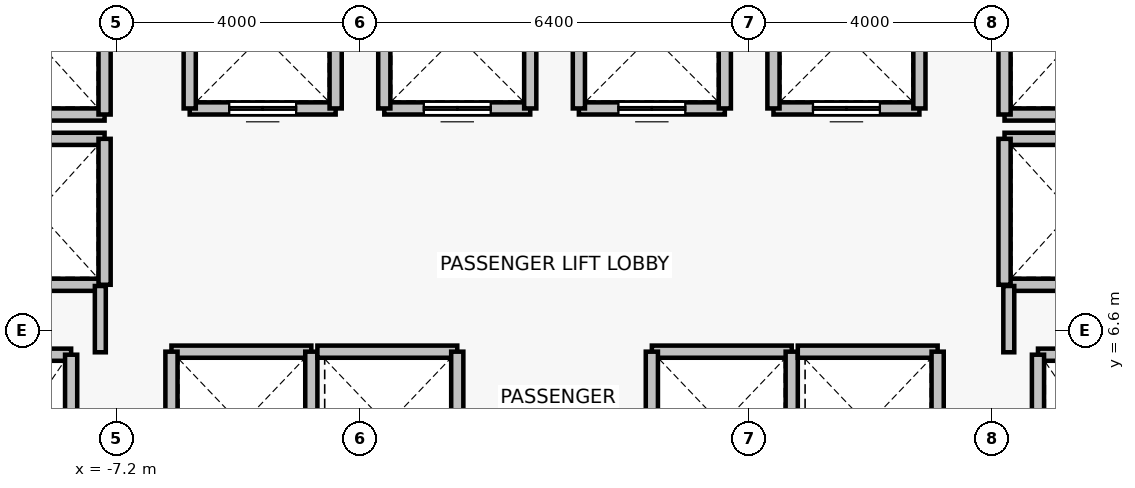
"""IFC4 building model, lengths in metres.
Left out: names, types, materials, properties, quantities, classifications, styles, units other than length and angle.
Written with IfcOpenShell. Run it as: python <this file> out.ifc"""

import sys

from ifc_helpers import new_model, si_unit, direction, frame, frame_2d, origin, place, context, subcontext, project, spatial, rectangle, extrude, source, transform, mapped, element, fill, save


model = new_model("IFC4")
c1 = context("Model", 3, precision=1e-05, world=origin(), true_north=direction((0.0, 1.0)))
c2 = subcontext(c1, "Body", "Model", "MODEL_VIEW")
j1 = project(units=[si_unit("LENGTHUNIT", "METRE"), si_unit("PLANEANGLEUNIT", "RADIAN")], contexts=[c1])
p1 = place(None, origin())
s1 = spatial("IfcSite", under=j1, at=p1, CompositionType="ELEMENT")
p2 = place(p1, origin())
s2 = spatial("IfcBuilding", under=s1, at=p2, CompositionType="ELEMENT")
p3 = place(p2, frame((0.0, 0.0, 30.7)))
s3 = spatial("IfcBuildingStorey", under=s2, at=p3, CompositionType="ELEMENT", Elevation=30.7)
p4 = place(p3, frame((-9.95, 6.2, 0.0), z_axis=(0.0, 0.0, 1.0), x_axis=(1.0, 0.0, 0.0)))
e1 = element("IfcWall", 1, at=p4, inside=s3, PredefinedType="SOLIDWALL", context=c2, shape_type="SweptSolid", body=[
    extrude(rectangle(XDim=2.0, YDim=0.2, at=frame_2d((1.0, 0.0))), origin(), (0.0, 0.0, 1.0), 3.075),
])
p5 = place(p3, frame((-7.95, 6.2, 0.0), z_axis=(0.0, 0.0, 1.0), x_axis=(0.0, -1.0, 0.0)))
e2 = element("IfcWall", 2, at=p5, inside=s3, PredefinedType="SOLIDWALL", context=c2, shape_type="SweptSolid", body=[
    extrude(rectangle(XDim=2.8, YDim=0.2, at=frame_2d((1.4, 0.0))), origin(), (0.0, 0.0, 1.0), 3.075),
])
p6 = place(p3, frame((7.95, 6.2, 0.0), z_axis=(0.0, 0.0, 1.0), x_axis=(1.0, 0.0, 0.0)))
e3 = element("IfcWall", 3, at=p6, inside=s3, PredefinedType="SOLIDWALL", context=c2, shape_type="SweptSolid", body=[
    extrude(rectangle(XDim=2.0, YDim=0.2, at=frame_2d((1.0, 0.0))), origin(), (0.0, 0.0, 1.0), 3.075),
])
p7 = place(p3, frame((7.95, 3.4, 0.0), z_axis=(0.0, 0.0, 1.0), x_axis=(0.0, 1.0, 0.0)))
e4 = element("IfcWall", 4, at=p7, inside=s3, PredefinedType="SOLIDWALL", context=c2, shape_type="SweptSolid", body=[
    extrude(rectangle(XDim=2.8, YDim=0.2, at=frame_2d((1.4, 0.0))), origin(), (0.0, 0.0, 1.0), 3.075),
])
p8 = place(p3, frame((-3.6, 10.25, 0.0), z_axis=(0.0, 0.0, 1.0), x_axis=(-1.0, 0.0, 0.0)))
e5 = element("IfcWall", 5, at=p8, inside=s3, PredefinedType="SOLIDWALL", context=c2, shape_type="SweptSolid", body=[
    extrude(rectangle(XDim=2.4, YDim=0.2, at=frame_2d((1.2, 0.0))), origin(), (0.0, 0.0, 1.0), 3.075),
])
p9 = place(p8, frame((0.65, 0.0, 0.0)))
e6 = element("IfcOpeningElement", 6, at=p9, cuts=e5, PredefinedType="OPENING", context=c2, shape_type="SweptSolid", body=[
    extrude(rectangle(XDim=1.1, YDim=2.2, at=frame_2d((0.55, 1.1))), frame((0.0, 0.11, 0.0), z_axis=(0.0, -1.0, 0.0), x_axis=(1.0, 0.0, 0.0)), (0.0, 0.0, 1.0), 0.22),
])
for number, where, z_axis, x_axis in (
    (7, (-6.0, 10.25, 0.0), (0.0, 0.0, 1.0), (0.0, 1.0, 0.0)),
    (8, (-3.6, 12.65, 0.0), (0.0, 0.0, 1.0), (0.0, -1.0, 0.0)),
):
    element("IfcWall", number, at=place(p3, frame(where, z_axis=z_axis, x_axis=x_axis)), inside=s3, PredefinedType="SOLIDWALL", context=c2, shape_type="SweptSolid", body=[
        extrude(rectangle(XDim=2.4, YDim=0.2, at=frame_2d((1.2, 0.0))), origin(), (0.0, 0.0, 1.0), 3.075),
    ])
p10 = place(p3, frame((-0.4, 10.25, 0.0), z_axis=(0.0, 0.0, 1.0), x_axis=(-1.0, 0.0, 0.0)))
e9 = element("IfcWall", 9, at=p10, inside=s3, PredefinedType="SOLIDWALL", context=c2, shape_type="SweptSolid", body=[
    extrude(rectangle(XDim=2.4, YDim=0.2, at=frame_2d((1.2, 0.0))), origin(), (0.0, 0.0, 1.0), 3.075),
])
p11 = place(p10, frame((0.65, 0.0, 0.0)))
e10 = element("IfcOpeningElement", 10, at=p11, cuts=e9, PredefinedType="OPENING", context=c2, shape_type="SweptSolid", body=[
    extrude(rectangle(XDim=1.1, YDim=2.2, at=frame_2d((0.55, 1.1))), frame((0.0, 0.11, 0.0), z_axis=(0.0, -1.0, 0.0), x_axis=(1.0, 0.0, 0.0)), (0.0, 0.0, 1.0), 0.22),
])
for number, where, z_axis, x_axis in (
    (11, (-2.8, 10.25, 0.0), (0.0, 0.0, 1.0), (0.0, 1.0, 0.0)),
    (12, (-0.4, 12.65, 0.0), (0.0, 0.0, 1.0), (0.0, -1.0, 0.0)),
):
    element("IfcWall", number, at=place(p3, frame(where, z_axis=z_axis, x_axis=x_axis)), inside=s3, PredefinedType="SOLIDWALL", context=c2, shape_type="SweptSolid", body=[
        extrude(rectangle(XDim=2.4, YDim=0.2, at=frame_2d((1.2, 0.0))), origin(), (0.0, 0.0, 1.0), 3.075),
    ])
p12 = place(p3, frame((2.8, 10.25, 0.0), z_axis=(0.0, 0.0, 1.0), x_axis=(-1.0, 0.0, 0.0)))
e13 = element("IfcWall", 13, at=p12, inside=s3, PredefinedType="SOLIDWALL", context=c2, shape_type="SweptSolid", body=[
    extrude(rectangle(XDim=2.4, YDim=0.2, at=frame_2d((1.2, 0.0))), origin(), (0.0, 0.0, 1.0), 3.075),
])
p13 = place(p12, frame((0.65, 0.0, 0.0)))
e14 = element("IfcOpeningElement", 14, at=p13, cuts=e13, PredefinedType="OPENING", context=c2, shape_type="SweptSolid", body=[
    extrude(rectangle(XDim=1.1, YDim=2.2, at=frame_2d((0.55, 1.1))), frame((0.0, 0.11, 0.0), z_axis=(0.0, -1.0, 0.0), x_axis=(1.0, 0.0, 0.0)), (0.0, 0.0, 1.0), 0.22),
])
for number, where, z_axis, x_axis in (
    (15, (0.4, 10.25, 0.0), (0.0, 0.0, 1.0), (0.0, 1.0, 0.0)),
    (16, (2.8, 12.65, 0.0), (0.0, 0.0, 1.0), (0.0, -1.0, 0.0)),
):
    element("IfcWall", number, at=place(p3, frame(where, z_axis=z_axis, x_axis=x_axis)), inside=s3, PredefinedType="SOLIDWALL", context=c2, shape_type="SweptSolid", body=[
        extrude(rectangle(XDim=2.4, YDim=0.2, at=frame_2d((1.2, 0.0))), origin(), (0.0, 0.0, 1.0), 3.075),
    ])
p14 = place(p3, frame((6.0, 10.25, 0.0), z_axis=(0.0, 0.0, 1.0), x_axis=(-1.0, 0.0, 0.0)))
e17 = element("IfcWall", 17, at=p14, inside=s3, PredefinedType="SOLIDWALL", context=c2, shape_type="SweptSolid", body=[
    extrude(rectangle(XDim=2.4, YDim=0.2, at=frame_2d((1.2, 0.0))), origin(), (0.0, 0.0, 1.0), 3.075),
])
p15 = place(p14, frame((0.65, 0.0, 0.0)))
e18 = element("IfcOpeningElement", 18, at=p15, cuts=e17, PredefinedType="OPENING", context=c2, shape_type="SweptSolid", body=[
    extrude(rectangle(XDim=1.1, YDim=2.2, at=frame_2d((0.55, 1.1))), frame((0.0, 0.11, 0.0), z_axis=(0.0, -1.0, 0.0), x_axis=(1.0, 0.0, 0.0)), (0.0, 0.0, 1.0), 0.22),
])
for number, where, z_axis, x_axis in (
    (19, (3.6, 10.25, 0.0), (0.0, 0.0, 1.0), (0.0, 1.0, 0.0)),
    (20, (6.0, 12.65, 0.0), (0.0, 0.0, 1.0), (0.0, -1.0, 0.0)),
):
    element("IfcWall", number, at=place(p3, frame(where, z_axis=z_axis, x_axis=x_axis)), inside=s3, PredefinedType="SOLIDWALL", context=c2, shape_type="SweptSolid", body=[
        extrude(rectangle(XDim=2.4, YDim=0.2, at=frame_2d((1.2, 0.0))), origin(), (0.0, 0.0, 1.0), 3.075),
    ])
p16 = place(p3, frame((-6.3, 6.25, 0.0), z_axis=(0.0, 0.0, 1.0), x_axis=(1.0, 0.0, 0.0)))
e21 = element("IfcWall", 21, at=p16, inside=s3, PredefinedType="SOLIDWALL", context=c2, shape_type="SweptSolid", body=[
    extrude(rectangle(XDim=2.3, YDim=0.2, at=frame_2d((1.15, 0.0))), origin(), (0.0, 0.0, 1.0), 3.075),
])
for number, where, z_axis, x_axis in (
    (22, (-6.3, 3.85, 0.0), (0.0, 0.0, 1.0), (0.0, 1.0, 0.0)),
    (23, (-4.0, 6.25, 0.0), (0.0, 0.0, 1.0), (0.0, -1.0, 0.0)),
):
    element("IfcWall", number, at=place(p3, frame(where, z_axis=z_axis, x_axis=x_axis)), inside=s3, PredefinedType="SOLIDWALL", context=c2, shape_type="SweptSolid", body=[
        extrude(rectangle(XDim=2.4, YDim=0.2, at=frame_2d((1.2, 0.0))), origin(), (0.0, 0.0, 1.0), 3.075),
    ])
p17 = place(p3, frame((-3.9, 6.25, 0.0), z_axis=(0.0, 0.0, 1.0), x_axis=(1.0, 0.0, 0.0)))
e24 = element("IfcWall", 24, at=p17, inside=s3, PredefinedType="SOLIDWALL", context=c2, shape_type="SweptSolid", body=[
    extrude(rectangle(XDim=2.3, YDim=0.2, at=frame_2d((1.15, 0.0))), origin(), (0.0, 0.0, 1.0), 3.075),
])
p18 = place(p3, frame((-1.6, 6.25, 0.0), z_axis=(0.0, 0.0, 1.0), x_axis=(0.0, -1.0, 0.0)))
e25 = element("IfcWall", 25, at=p18, inside=s3, PredefinedType="SOLIDWALL", context=c2, shape_type="SweptSolid", body=[
    extrude(rectangle(XDim=2.4, YDim=0.2, at=frame_2d((1.2, 0.0))), origin(), (0.0, 0.0, 1.0), 3.075),
])
p19 = place(p3, frame((1.6, 6.25, 0.0), z_axis=(0.0, 0.0, 1.0), x_axis=(1.0, 0.0, 0.0)))
e26 = element("IfcWall", 26, at=p19, inside=s3, PredefinedType="SOLIDWALL", context=c2, shape_type="SweptSolid", body=[
    extrude(rectangle(XDim=2.3, YDim=0.2, at=frame_2d((1.15, 0.0))), origin(), (0.0, 0.0, 1.0), 3.075),
])
for number, where, z_axis, x_axis in (
    (27, (1.6, 3.85, 0.0), (0.0, 0.0, 1.0), (0.0, 1.0, 0.0)),
    (28, (3.9, 6.25, 0.0), (0.0, 0.0, 1.0), (0.0, -1.0, 0.0)),
):
    element("IfcWall", number, at=place(p3, frame(where, z_axis=z_axis, x_axis=x_axis)), inside=s3, PredefinedType="SOLIDWALL", context=c2, shape_type="SweptSolid", body=[
        extrude(rectangle(XDim=2.4, YDim=0.2, at=frame_2d((1.2, 0.0))), origin(), (0.0, 0.0, 1.0), 3.075),
    ])
p20 = place(p3, frame((4.0, 6.25, 0.0), z_axis=(0.0, 0.0, 1.0), x_axis=(1.0, 0.0, 0.0)))
e29 = element("IfcWall", 29, at=p20, inside=s3, PredefinedType="SOLIDWALL", context=c2, shape_type="SweptSolid", body=[
    extrude(rectangle(XDim=2.3, YDim=0.2, at=frame_2d((1.15, 0.0))), origin(), (0.0, 0.0, 1.0), 3.075),
])
p21 = place(p3, frame((6.3, 6.25, 0.0), z_axis=(0.0, 0.0, 1.0), x_axis=(0.0, -1.0, 0.0)))
e30 = element("IfcWall", 30, at=p21, inside=s3, PredefinedType="SOLIDWALL", context=c2, shape_type="SweptSolid", body=[
    extrude(rectangle(XDim=2.4, YDim=0.2, at=frame_2d((1.2, 0.0))), origin(), (0.0, 0.0, 1.0), 3.075),
])
for number, where, z_axis, x_axis in (
    (31, (-7.4, 7.35, 0.0), (0.0, 0.0, 1.0), (-1.0, 0.0, 0.0)),
    (32, (-9.6, 9.75, 0.0), (0.0, 0.0, 1.0), (1.0, 0.0, 0.0)),
):
    element("IfcWall", number, at=place(p3, frame(where, z_axis=z_axis, x_axis=x_axis)), inside=s3, PredefinedType="SOLIDWALL", context=c2, shape_type="SweptSolid", body=[
        extrude(rectangle(XDim=2.2, YDim=0.2, at=frame_2d((1.1, 0.0))), origin(), (0.0, 0.0, 1.0), 2.465),
    ])
p22 = place(p3, frame((-7.4, 9.75, 0.0), z_axis=(0.0, 0.0, 1.0), x_axis=(0.0, -1.0, 0.0)))
e33 = element("IfcWall", 33, at=p22, inside=s3, PredefinedType="SOLIDWALL", context=c2, shape_type="SweptSolid", body=[
    extrude(rectangle(XDim=2.4, YDim=0.2, at=frame_2d((1.2, 0.0))), origin(), (0.0, 0.0, 1.0), 2.465),
])
p23 = place(p3, frame((-7.4, 10.15, 0.0), z_axis=(0.0, 0.0, 1.0), x_axis=(-1.0, 0.0, 0.0)))
e34 = element("IfcWall", 34, at=p23, inside=s3, PredefinedType="SOLIDWALL", context=c2, shape_type="SweptSolid", body=[
    extrude(rectangle(XDim=2.2, YDim=0.2, at=frame_2d((1.1, 0.0))), origin(), (0.0, 0.0, 1.0), 2.465),
])
p24 = place(p3, frame((-7.4, 12.55, 0.0), z_axis=(0.0, 0.0, 1.0), x_axis=(0.0, -1.0, 0.0)))
e35 = element("IfcWall", 35, at=p24, inside=s3, PredefinedType="SOLIDWALL", context=c2, shape_type="SweptSolid", body=[
    extrude(rectangle(XDim=2.4, YDim=0.2, at=frame_2d((1.2, 0.0))), origin(), (0.0, 0.0, 1.0), 2.465),
])
for number, where, z_axis, x_axis in (
    (36, (9.6, 7.35, 0.0), (0.0, 0.0, 1.0), (-1.0, 0.0, 0.0)),
    (37, (7.4, 9.75, 0.0), (0.0, 0.0, 1.0), (1.0, 0.0, 0.0)),
):
    element("IfcWall", number, at=place(p3, frame(where, z_axis=z_axis, x_axis=x_axis)), inside=s3, PredefinedType="SOLIDWALL", context=c2, shape_type="SweptSolid", body=[
        extrude(rectangle(XDim=2.2, YDim=0.2, at=frame_2d((1.1, 0.0))), origin(), (0.0, 0.0, 1.0), 2.465),
    ])
p25 = place(p3, frame((7.4, 7.35, 0.0), z_axis=(0.0, 0.0, 1.0), x_axis=(0.0, 1.0, 0.0)))
e38 = element("IfcWall", 38, at=p25, inside=s3, PredefinedType="SOLIDWALL", context=c2, shape_type="SweptSolid", body=[
    extrude(rectangle(XDim=2.4, YDim=0.2, at=frame_2d((1.2, 0.0))), origin(), (0.0, 0.0, 1.0), 2.465),
])
p26 = place(p3, frame((9.6, 10.15, 0.0), z_axis=(0.0, 0.0, 1.0), x_axis=(-1.0, 0.0, 0.0)))
e39 = element("IfcWall", 39, at=p26, inside=s3, PredefinedType="SOLIDWALL", context=c2, shape_type="SweptSolid", body=[
    extrude(rectangle(XDim=2.2, YDim=0.2, at=frame_2d((1.1, 0.0))), origin(), (0.0, 0.0, 1.0), 2.465),
])
p27 = place(p3, frame((7.4, 10.15, 0.0), z_axis=(0.0, 0.0, 1.0), x_axis=(0.0, 1.0, 0.0)))
e40 = element("IfcWall", 40, at=p27, inside=s3, PredefinedType="SOLIDWALL", context=c2, shape_type="SweptSolid", body=[
    extrude(rectangle(XDim=2.4, YDim=0.2, at=frame_2d((1.2, 0.0))), origin(), (0.0, 0.0, 1.0), 2.465),
])
for number, where, z_axis, x_axis in (
    (41, (-7.47, 7.33, 0.0), (0.0, 0.0, 1.0), (0.0, -1.0, 0.0)),
    (42, (7.47, 6.24, 0.0), (0.0, 0.0, 1.0), (0.0, 1.0, 0.0)),
):
    element("IfcWall", number, at=place(p3, frame(where, z_axis=z_axis, x_axis=x_axis)), inside=s3, PredefinedType="PARTITIONING", context=c2, shape_type="SweptSolid", body=[
        extrude(rectangle(XDim=1.09, YDim=0.18, at=frame_2d((0.545, 0.0))), origin(), (0.0, 0.0, 1.0), 2.465),
    ])
m1 = source(origin(), c2, "Body", "SweptSolid", [
    extrude(rectangle(XDim=1.1, YDim=2.2, at=frame_2d((0.55, 1.1))), frame((0.0, 0.025, 0.0), z_axis=(0.0, -1.0, 0.0), x_axis=(1.0, 0.0, 0.0)), (0.0, 0.0, 1.0), 0.05),
])
p28 = place(p9, origin())
e43 = element("IfcDoor", 43, at=p28, inside=s3, OperationType="DOUBLE_DOOR_SLIDING", PredefinedType="DOOR", context=c2, shape_type="MappedRepresentation", body=[
    mapped(m1, transform((0.0, 0.0, 0.0), x_axis=(1.0, 0.0, 0.0), y_axis=(0.0, 1.0, 0.0), z_axis=(0.0, 0.0, 1.0), scale=1.0)),
])
fill(e6, e43)
p29 = place(p11, origin())
e44 = element("IfcDoor", 44, at=p29, inside=s3, OperationType="DOUBLE_DOOR_SLIDING", PredefinedType="DOOR", context=c2, shape_type="MappedRepresentation", body=[
    mapped(m1, transform((0.0, 0.0, 0.0), x_axis=(1.0, 0.0, 0.0), y_axis=(0.0, 1.0, 0.0), z_axis=(0.0, 0.0, 1.0), scale=1.0)),
])
fill(e10, e44)
p30 = place(p13, origin())
e45 = element("IfcDoor", 45, at=p30, inside=s3, OperationType="DOUBLE_DOOR_SLIDING", PredefinedType="DOOR", context=c2, shape_type="MappedRepresentation", body=[
    mapped(m1, transform((0.0, 0.0, 0.0), x_axis=(1.0, 0.0, 0.0), y_axis=(0.0, 1.0, 0.0), z_axis=(0.0, 0.0, 1.0), scale=1.0)),
])
fill(e14, e45)
p31 = place(p15, origin())
e46 = element("IfcDoor", 46, at=p31, inside=s3, OperationType="DOUBLE_DOOR_SLIDING", PredefinedType="DOOR", context=c2, shape_type="MappedRepresentation", body=[
    mapped(m1, transform((0.0, 0.0, 0.0), x_axis=(1.0, 0.0, 0.0), y_axis=(0.0, 1.0, 0.0), z_axis=(0.0, 0.0, 1.0), scale=1.0)),
])
fill(e18, e46)
save(model, sys.argv[1])
